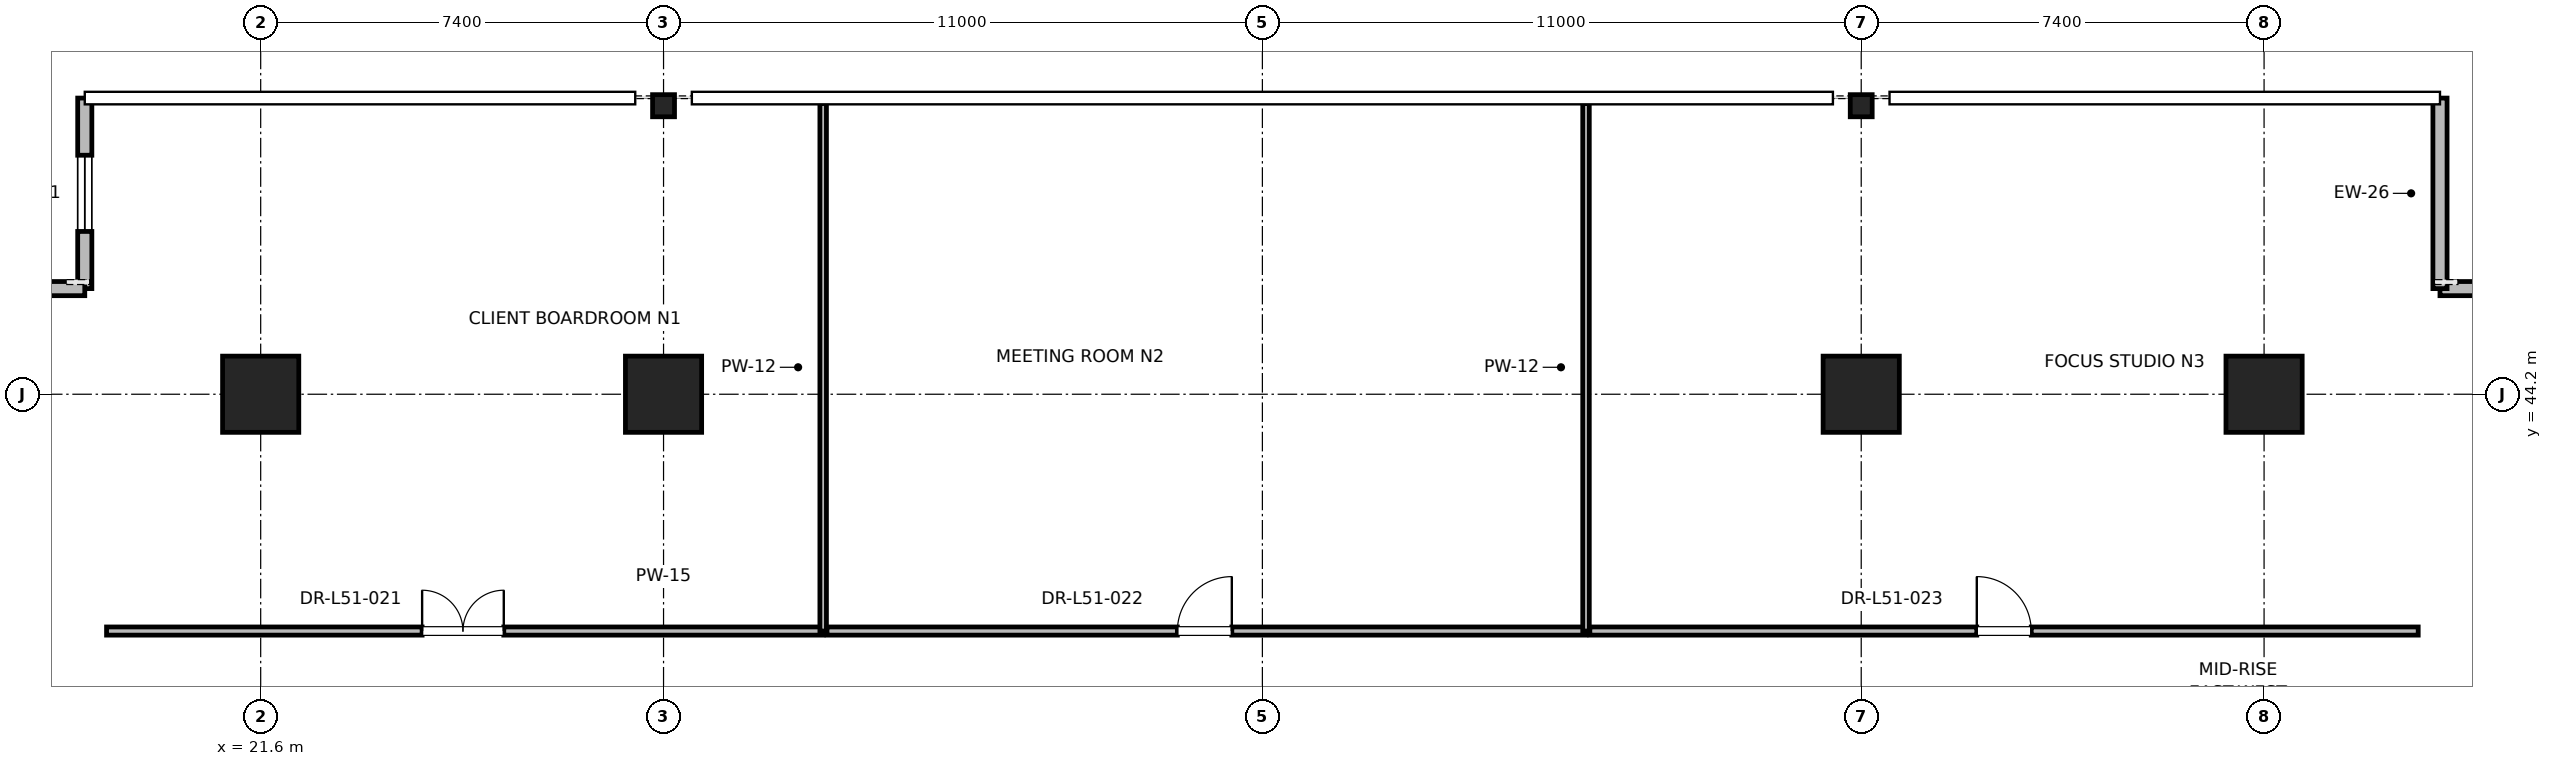
"""IFC4 building model, lengths in metres.
Left out: names, types, materials, properties, quantities, classifications, styles, units other than length and angle.
Written with IfcOpenShell. Run it as: python <this file> out.ifc"""

import sys

from ifc_helpers import new_model, si_unit, direction, frame, frame_2d, origin, origin_2d, place, context, subcontext, project, spatial, rectangle, i_section, extrude, element, fill, save


model = new_model("IFC4")
c1 = context("Model", 3, precision=1e-05, world=origin(), true_north=direction((0.0, 1.0)))
c2 = subcontext(c1, "Body", "Model", "MODEL_VIEW")
j1 = project(units=[si_unit("LENGTHUNIT", "METRE"), si_unit("PLANEANGLEUNIT", "RADIAN")], contexts=[c1])
p1 = place(None, origin())
s1 = spatial("IfcSite", under=j1, at=p1, CompositionType="ELEMENT")
p2 = place(p1, origin())
s2 = spatial("IfcBuilding", under=s1, at=p2, CompositionType="ELEMENT")
p3 = place(p2, frame((0.0, 0.0, 221.2)))
s3 = spatial("IfcBuildingStorey", under=s2, at=p3, CompositionType="ELEMENT", Elevation=221.2)
for number, where, z_axis, x_axis in (
    (1, (29.0, 44.2, 0.0), (0.0, 0.0, 1.0), (1.0, 0.0, 0.0)),
    (2, (51.0, 44.2, 0.0), (0.0, 0.0, 1.0), (1.0, 0.0, 0.0)),
    (3, (21.6, 44.2, 0.0), (0.0, 0.0, 1.0), (1.0, 0.0, 0.0)),
    (4, (58.4, 44.2, 0.0), (0.0, 0.0, 1.0), (1.0, 0.0, 0.0)),
):
    element("IfcColumn", number, at=place(p3, frame(where, z_axis=z_axis, x_axis=x_axis)), inside=s3, PredefinedType="COLUMN", context=c2, shape_type="SweptSolid", body=[
        extrude(rectangle(XDim=1.4, YDim=1.4, at=origin_2d()), origin(), (0.0, 0.0, 1.0), 4.0),
    ])
for number, where, z_axis, x_axis in (
    (5, (29.0, 49.5, 0.0), (0.0, 0.0, 1.0), (1.0, 0.0, 0.0)),
    (6, (51.0, 49.5, 0.0), (0.0, 0.0, 1.0), (1.0, 0.0, 0.0)),
):
    element("IfcColumn", number, at=place(p3, frame(where, z_axis=z_axis, x_axis=x_axis)), inside=s3, PredefinedType="COLUMN", context=c2, shape_type="SweptSolid", body=[
        extrude(i_section(OverallWidth=0.403, OverallDepth=0.406, WebThickness=0.027, FlangeThickness=0.043, FilletRadius=0.015, at=origin_2d()), origin(), (0.0, 0.0, 1.0), 4.0),
    ])
p4 = place(p3, frame((65.631, 46.14, 0.0), z_axis=(0.0, 0.0, 1.0), x_axis=(-1.0, 0.0, 0.0)))
e7 = element("IfcWall", 7, at=p4, inside=s3, PredefinedType="PARAPET", context=c2, shape_type="SweptSolid", body=[
    extrude(rectangle(XDim=4.0, YDim=0.26, at=frame_2d((2.0, 0.0))), origin(), (0.0, 0.0, 1.0), 3.775),
])
p5 = place(p4, frame((1.3, 0.0, 0.85)))
e8 = element("IfcOpeningElement", 8, at=p5, cuts=e7, PredefinedType="OPENING", context=c2, shape_type="SweptSolid", body=[
    extrude(rectangle(XDim=1.4, YDim=2.0, at=frame_2d((0.7, 1.0))), frame((0.0, 0.13, 0.0), z_axis=(0.0, -1.0, 0.0), x_axis=(1.0, 0.0, 0.0)), (0.0, 0.0, 1.0), 0.26),
])
p6 = place(p3, frame((61.631, 46.14, 0.0), z_axis=(0.0, 0.0, 1.0), x_axis=(0.0, 1.0, 0.0)))
e9 = element("IfcWall", 9, at=p6, inside=s3, PredefinedType="PARAPET", context=c2, shape_type="SweptSolid", body=[
    extrude(rectangle(XDim=3.5, YDim=0.26, at=frame_2d((1.75, 0.0))), origin(), (0.0, 0.0, 1.0), 3.775),
])
p7 = place(p3, frame((18.369, 49.64, 0.0), z_axis=(0.0, 0.0, 1.0), x_axis=(0.0, -1.0, 0.0)))
e10 = element("IfcWall", 10, at=p7, inside=s3, PredefinedType="PARAPET", context=c2, shape_type="SweptSolid", body=[
    extrude(rectangle(XDim=3.5, YDim=0.26, at=frame_2d((1.75, 0.0))), origin(), (0.0, 0.0, 1.0), 3.775),
])
p8 = place(p7, frame((1.05, 0.0, 0.85)))
e11 = element("IfcOpeningElement", 11, at=p8, cuts=e10, PredefinedType="OPENING", context=c2, shape_type="SweptSolid", body=[
    extrude(rectangle(XDim=1.4, YDim=2.0, at=frame_2d((0.7, 1.0))), frame((0.0, 0.13, 0.0), z_axis=(0.0, -1.0, 0.0), x_axis=(1.0, 0.0, 0.0)), (0.0, 0.0, 1.0), 0.26),
])
p9 = place(p3, frame((18.369, 46.14, 0.0), z_axis=(0.0, 0.0, 1.0), x_axis=(-1.0, 0.0, 0.0)))
e12 = element("IfcWall", 12, at=p9, inside=s3, PredefinedType="PARAPET", context=c2, shape_type="SweptSolid", body=[
    extrude(rectangle(XDim=4.0, YDim=0.26, at=frame_2d((2.0, 0.0))), origin(), (0.0, 0.0, 1.0), 3.775),
])
p10 = place(p3, frame((18.769, 39.85, 0.0), z_axis=(0.0, 0.0, 1.0), x_axis=(1.0, 0.0, 0.0)))
e13 = element("IfcWall", 13, at=p10, inside=s3, PredefinedType="PARTITIONING", context=c2, shape_type="SweptSolid", body=[
    extrude(rectangle(XDim=13.163, YDim=0.15, at=frame_2d((6.582, 0.0))), origin(), (0.0, 0.0, 1.0), 2.85),
])
p11 = place(p10, frame((5.797, 0.0, 0.0)))
e14 = element("IfcOpeningElement", 14, at=p11, cuts=e13, PredefinedType="OPENING", context=c2, shape_type="SweptSolid", body=[
    extrude(rectangle(XDim=1.5, YDim=2.25, at=frame_2d((0.75, 1.125))), frame((0.0, 0.075, 0.0), z_axis=(0.0, -1.0, 0.0), x_axis=(1.0, 0.0, 0.0)), (0.0, 0.0, 1.0), 0.15),
])
p12 = place(p3, frame((31.932, 39.85, 0.0), z_axis=(0.0, 0.0, 1.0), x_axis=(0.0, 1.0, 0.0)))
e15 = element("IfcWall", 15, at=p12, inside=s3, PredefinedType="PARTITIONING", context=c2, shape_type="SweptSolid", body=[
    extrude(rectangle(XDim=9.69, YDim=0.12, at=frame_2d((4.845, 0.0))), origin(), (0.0, 0.0, 1.0), 2.405),
])
p13 = place(p3, frame((32.002, 39.85, 0.0), z_axis=(0.0, 0.0, 1.0), x_axis=(1.0, 0.0, 0.0)))
e16 = element("IfcWall", 16, at=p13, inside=s3, PredefinedType="PARTITIONING", context=c2, shape_type="SweptSolid", body=[
    extrude(rectangle(XDim=13.943, YDim=0.15, at=frame_2d((6.971, 0.0))), origin(), (0.0, 0.0, 1.0), 2.85),
])
p14 = place(p13, frame((6.436, 0.0, 0.0)))
e17 = element("IfcOpeningElement", 17, at=p14, cuts=e16, PredefinedType="OPENING", context=c2, shape_type="SweptSolid", body=[
    extrude(rectangle(XDim=1.0, YDim=2.15, at=frame_2d((0.5, 1.075))), frame((0.0, 0.075, 0.0), z_axis=(0.0, -1.0, 0.0), x_axis=(1.0, 0.0, 0.0)), (0.0, 0.0, 1.0), 0.15),
])
p15 = place(p3, frame((45.945, 39.85, 0.0), z_axis=(0.0, 0.0, 1.0), x_axis=(0.0, 1.0, 0.0)))
e18 = element("IfcWall", 18, at=p15, inside=s3, PredefinedType="PARTITIONING", context=c2, shape_type="SweptSolid", body=[
    extrude(rectangle(XDim=9.69, YDim=0.12, at=frame_2d((4.845, 0.0))), origin(), (0.0, 0.0, 1.0), 2.405),
])
p16 = place(p3, frame((46.015, 39.85, 0.0), z_axis=(0.0, 0.0, 1.0), x_axis=(1.0, 0.0, 0.0)))
e19 = element("IfcWall", 19, at=p16, inside=s3, PredefinedType="PARTITIONING", context=c2, shape_type="SweptSolid", body=[
    extrude(rectangle(XDim=15.216, YDim=0.15, at=frame_2d((7.608, 0.0))), origin(), (0.0, 0.0, 1.0), 2.85),
])
p17 = place(p16, frame((7.108, 0.0, 0.0)))
e20 = element("IfcOpeningElement", 20, at=p17, cuts=e19, PredefinedType="OPENING", context=c2, shape_type="SweptSolid", body=[
    extrude(rectangle(XDim=1.0, YDim=2.15, at=frame_2d((0.5, 1.075))), frame((0.0, 0.075, 0.0), z_axis=(0.0, -1.0, 0.0), x_axis=(1.0, 0.0, 0.0)), (0.0, 0.0, 1.0), 0.15),
])
p18 = place(p8, origin())
e21 = element("IfcWindow", 21, at=p18, inside=s3, PartitioningType="SINGLE_PANEL", PredefinedType="WINDOW", context=c2, shape_type="SweptSolid", body=[
    extrude(rectangle(XDim=1.4, YDim=2.0, at=frame_2d((0.7, 1.0))), frame((0.0, 0.03, 0.0), z_axis=(0.0, -1.0, 0.0), x_axis=(1.0, 0.0, 0.0)), (0.0, 0.0, 1.0), 0.06),
])
fill(e11, e21)
p19 = place(p11, origin())
e22 = element("IfcDoor", 22, at=p19, inside=s3, OperationType="DOUBLE_DOOR_SINGLE_SWING", PredefinedType="DOOR", context=c2, shape_type="SweptSolid", body=[
    extrude(rectangle(XDim=1.5, YDim=2.25, at=frame_2d((0.75, 1.125))), frame((0.0, 0.025, 0.0), z_axis=(0.0, -1.0, 0.0), x_axis=(1.0, 0.0, 0.0)), (0.0, 0.0, 1.0), 0.05),
])
fill(e14, e22)
p20 = place(p14, origin())
e23 = element("IfcDoor", 23, at=p20, inside=s3, OperationType="SINGLE_SWING_RIGHT", PredefinedType="DOOR", context=c2, shape_type="SweptSolid", body=[
    extrude(rectangle(XDim=1.0, YDim=2.15, at=frame_2d((0.5, 1.075))), frame((0.0, 0.025, 0.0), z_axis=(0.0, -1.0, 0.0), x_axis=(1.0, 0.0, 0.0)), (0.0, 0.0, 1.0), 0.05),
])
fill(e17, e23)
p21 = place(p17, origin())
e24 = element("IfcDoor", 24, at=p21, inside=s3, OperationType="SINGLE_SWING_LEFT", PredefinedType="DOOR", context=c2, shape_type="SweptSolid", body=[
    extrude(rectangle(XDim=1.0, YDim=2.15, at=frame_2d((0.5, 1.075))), frame((0.0, 0.025, 0.0), z_axis=(0.0, -1.0, 0.0), x_axis=(1.0, 0.0, 0.0)), (0.0, 0.0, 1.0), 0.05),
])
fill(e20, e24)
save(model, sys.argv[1])
